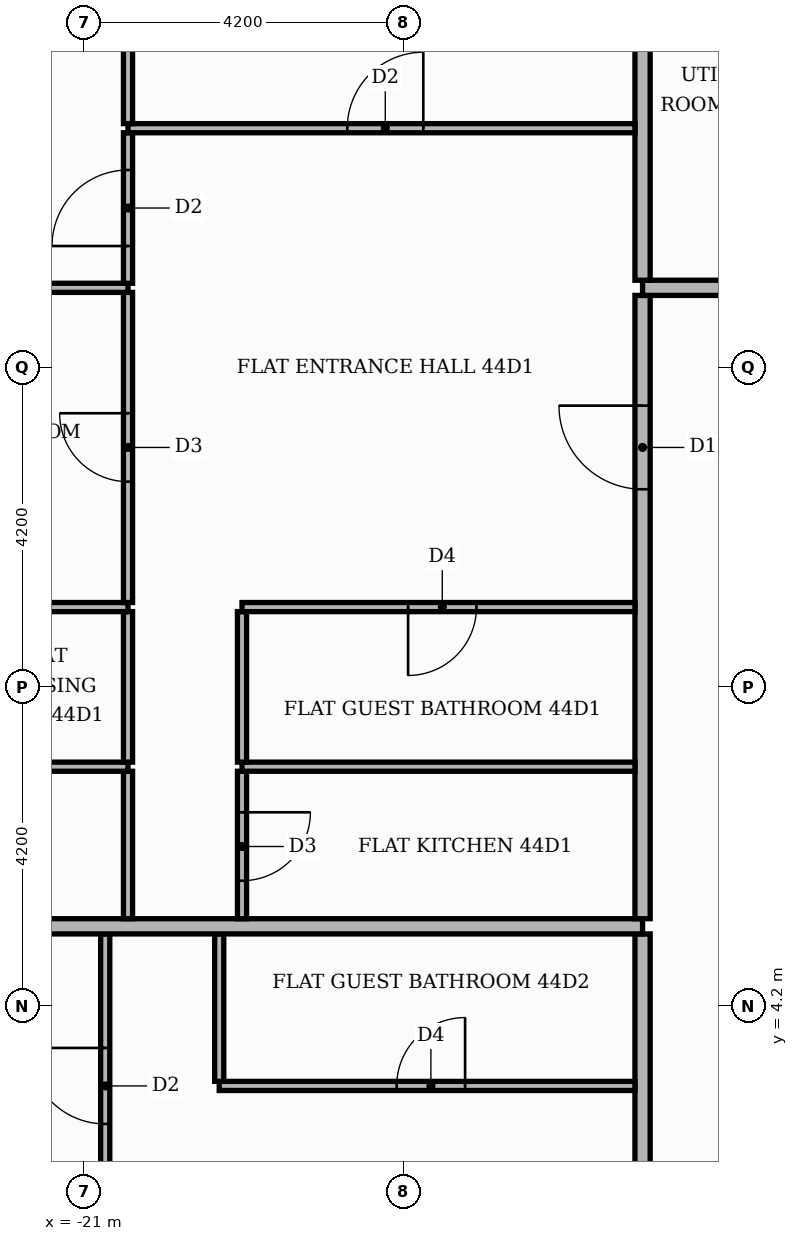
"""IFC4 building model, lengths in metres.
Left out: names, types, materials, properties, quantities, classifications, styles, units other than length and angle.
Written with IfcOpenShell. Run it as: python <this file> out.ifc"""

import sys

from ifc_helpers import new_model, si_unit, direction, frame, frame_2d, origin, place, context, subcontext, project, spatial, rectangle, extrude, element, fill, save


model = new_model("IFC4")
c1 = context("Model", 3, precision=1e-05, world=origin(), true_north=direction((0.0, 1.0)))
c2 = subcontext(c1, "Body", "Model", "MODEL_VIEW")
j1 = project(units=[si_unit("LENGTHUNIT", "METRE"), si_unit("PLANEANGLEUNIT", "RADIAN")], contexts=[c1])
p1 = place(None, origin())
s1 = spatial("IfcSite", under=j1, at=p1, CompositionType="ELEMENT")
p2 = place(p1, origin())
s2 = spatial("IfcBuilding", under=s1, at=p2, CompositionType="ELEMENT")
p3 = place(p2, frame((0.0, 0.0, 188.4)))
s3 = spatial("IfcBuildingStorey", under=s2, at=p3, CompositionType="ELEMENT", Elevation=188.4)
p4 = place(p3, frame((-13.65, -13.55, 0.0), z_axis=(0.0, 0.0, 1.0), x_axis=(0.0, 1.0, 0.0)))
e1 = element("IfcWall", 1, at=p4, inside=s3, PredefinedType="PARTITIONING", context=c2, shape_type="SweptSolid", body=[
    extrude(rectangle(XDim=18.7, YDim=0.2, at=frame_2d((9.35, 0.0))), origin(), (0.0, 0.0, 1.0), 3.48),
])
p5 = place(p4, frame((14.05, 0.0, 0.0)))
e2 = element("IfcOpeningElement", 2, at=p5, cuts=e1, PredefinedType="OPENING", context=c2, shape_type="SweptSolid", body=[
    extrude(rectangle(XDim=1.1, YDim=2.4, at=frame_2d((0.55, 1.2))), frame((0.0, 0.11, 0.0), z_axis=(0.0, -1.0, 0.0), x_axis=(1.0, 0.0, 0.0)), (0.0, 0.0, 1.0), 0.22),
])
p6 = place(p3, frame((-20.72, 1.11, 0.0), z_axis=(0.0, 0.0, 1.0), x_axis=(0.0, 1.0, 0.0)))
e3 = element("IfcWall", 3, at=p6, inside=s3, PredefinedType="PARTITIONING", context=c2, shape_type="SweptSolid", body=[
    extrude(rectangle(XDim=4.04, YDim=0.12, at=frame_2d((2.02, 0.0))), origin(), (0.0, 0.0, 1.0), 3.48),
])
p7 = place(p6, frame((1.54, 0.0, 0.0)))
e4 = element("IfcOpeningElement", 4, at=p7, cuts=e3, PredefinedType="OPENING", context=c2, shape_type="SweptSolid", body=[
    extrude(rectangle(XDim=1.0, YDim=2.1, at=frame_2d((0.5, 1.05))), frame((0.0, 0.07, 0.0), z_axis=(0.0, -1.0, 0.0), x_axis=(1.0, 0.0, 0.0)), (0.0, 0.0, 1.0), 0.14),
])
p8 = place(p3, frame((-19.22, 3.15, 0.0), z_axis=(0.0, 0.0, 1.0), x_axis=(1.0, 0.0, 0.0)))
e5 = element("IfcWall", 5, at=p8, inside=s3, PredefinedType="PARTITIONING", context=c2, shape_type="SweptSolid", body=[
    extrude(rectangle(XDim=5.47, YDim=0.12, at=frame_2d((2.735, 0.0))), origin(), (0.0, 0.0, 1.0), 3.48),
])
p9 = place(p8, frame((2.335, 0.0, 0.0)))
e6 = element("IfcOpeningElement", 6, at=p9, cuts=e5, PredefinedType="OPENING", context=c2, shape_type="SweptSolid", body=[
    extrude(rectangle(XDim=0.9, YDim=2.1, at=frame_2d((0.45, 1.05))), frame((0.0, 0.07, 0.0), z_axis=(0.0, -1.0, 0.0), x_axis=(1.0, 0.0, 0.0)), (0.0, 0.0, 1.0), 0.14),
])
p10 = place(p3, frame((-19.22, 3.21, 0.0), z_axis=(0.0, 0.0, 1.0), x_axis=(0.0, 1.0, 0.0)))
e7 = element("IfcWall", 7, at=p10, inside=s3, PredefinedType="PARTITIONING", context=c2, shape_type="SweptSolid", body=[
    extrude(rectangle(XDim=1.94, YDim=0.12, at=frame_2d((0.97, 0.0))), origin(), (0.0, 0.0, 1.0), 3.48),
])
p11 = place(p3, frame((-25.42, 5.25, 0.0), z_axis=(0.0, 0.0, 1.0), x_axis=(1.0, 0.0, 0.0)))
e8 = element("IfcWall", 8, at=p11, inside=s3, PredefinedType="PARTITIONING", context=c2, shape_type="SweptSolid", body=[
    extrude(rectangle(XDim=11.77, YDim=0.2, at=frame_2d((5.885, 0.0))), origin(), (0.0, 0.0, 1.0), 3.48),
])
p12 = place(p3, frame((-20.42, 5.35, 0.0), z_axis=(0.0, 0.0, 1.0), x_axis=(0.0, 1.0, 0.0)))
e9 = element("IfcWall", 9, at=p12, inside=s3, PredefinedType="PARTITIONING", context=c2, shape_type="SweptSolid", body=[
    extrude(rectangle(XDim=1.94, YDim=0.12, at=frame_2d((0.97, 0.0))), origin(), (0.0, 0.0, 1.0), 3.48),
])
p13 = place(p3, frame((-18.92, 5.35, 0.0), z_axis=(0.0, 0.0, 1.0), x_axis=(0.0, 1.0, 0.0)))
e10 = element("IfcWall", 10, at=p13, inside=s3, PredefinedType="PARTITIONING", context=c2, shape_type="SweptSolid", body=[
    extrude(rectangle(XDim=1.94, YDim=0.12, at=frame_2d((0.97, 0.0))), origin(), (0.0, 0.0, 1.0), 3.48),
])
p14 = place(p13, frame((0.5, 0.0, 0.0)))
e11 = element("IfcOpeningElement", 11, at=p14, cuts=e10, PredefinedType="OPENING", context=c2, shape_type="SweptSolid", body=[
    extrude(rectangle(XDim=0.9, YDim=2.1, at=frame_2d((0.45, 1.05))), frame((0.0, 0.07, 0.0), z_axis=(0.0, -1.0, 0.0), x_axis=(1.0, 0.0, 0.0)), (0.0, 0.0, 1.0), 0.14),
])
p15 = place(p3, frame((-13.65, 5.35, 0.0), z_axis=(0.0, 0.0, 1.0), x_axis=(0.0, 1.0, 0.0)))
e12 = element("IfcWall", 12, at=p15, inside=s3, PredefinedType="PARTITIONING", context=c2, shape_type="SweptSolid", body=[
    extrude(rectangle(XDim=8.2, YDim=0.2, at=frame_2d((4.1, 0.0))), origin(), (0.0, 0.0, 1.0), 3.48),
])
p16 = place(p15, frame((5.65, 0.0, 0.0)))
e13 = element("IfcOpeningElement", 13, at=p16, cuts=e12, PredefinedType="OPENING", context=c2, shape_type="SweptSolid", body=[
    extrude(rectangle(XDim=1.1, YDim=2.4, at=frame_2d((0.55, 1.2))), frame((0.0, 0.11, 0.0), z_axis=(0.0, -1.0, 0.0), x_axis=(1.0, 0.0, 0.0)), (0.0, 0.0, 1.0), 0.22),
])
p17 = place(p3, frame((-25.42, 7.35, 0.0), z_axis=(0.0, 0.0, 1.0), x_axis=(1.0, 0.0, 0.0)))
e14 = element("IfcWall", 14, at=p17, inside=s3, PredefinedType="PARTITIONING", context=c2, shape_type="SweptSolid", body=[
    extrude(rectangle(XDim=5.0, YDim=0.12, at=frame_2d((2.5, 0.0))), origin(), (0.0, 0.0, 1.0), 3.48),
])
p18 = place(p17, frame((1.9, 0.0, 0.0)))
e15 = element("IfcOpeningElement", 15, at=p18, cuts=e14, PredefinedType="OPENING", context=c2, shape_type="SweptSolid", body=[
    extrude(rectangle(XDim=0.9, YDim=2.1, at=frame_2d((0.45, 1.05))), frame((0.0, 0.07, 0.0), z_axis=(0.0, -1.0, 0.0), x_axis=(1.0, 0.0, 0.0)), (0.0, 0.0, 1.0), 0.14),
])
p19 = place(p3, frame((-18.92, 7.35, 0.0), z_axis=(0.0, 0.0, 1.0), x_axis=(1.0, 0.0, 0.0)))
e16 = element("IfcWall", 16, at=p19, inside=s3, PredefinedType="PARTITIONING", context=c2, shape_type="SweptSolid", body=[
    extrude(rectangle(XDim=5.17, YDim=0.12, at=frame_2d((2.585, 0.0))), origin(), (0.0, 0.0, 1.0), 3.48),
])
for number, where, z_axis, x_axis in (
    (17, (-20.42, 7.41, 0.0), (0.0, 0.0, 1.0), (0.0, 1.0, 0.0)),
    (18, (-18.92, 7.41, 0.0), (0.0, 0.0, 1.0), (0.0, 1.0, 0.0)),
):
    element("IfcWall", number, at=place(p3, frame(where, z_axis=z_axis, x_axis=x_axis)), inside=s3, PredefinedType="PARTITIONING", context=c2, shape_type="SweptSolid", body=[
        extrude(rectangle(XDim=1.98, YDim=0.12, at=frame_2d((0.99, 0.0))), origin(), (0.0, 0.0, 1.0), 3.48),
    ])
p20 = place(p3, frame((-25.42, 9.45, 0.0), z_axis=(0.0, 0.0, 1.0), x_axis=(1.0, 0.0, 0.0)))
e19 = element("IfcWall", 19, at=p20, inside=s3, PredefinedType="PARTITIONING", context=c2, shape_type="SweptSolid", body=[
    extrude(rectangle(XDim=5.0, YDim=0.12, at=frame_2d((2.5, 0.0))), origin(), (0.0, 0.0, 1.0), 3.48),
])
p21 = place(p20, frame((1.9, 0.0, 0.0)))
e20 = element("IfcOpeningElement", 20, at=p21, cuts=e19, PredefinedType="OPENING", context=c2, shape_type="SweptSolid", body=[
    extrude(rectangle(XDim=0.9, YDim=2.1, at=frame_2d((0.45, 1.05))), frame((0.0, 0.07, 0.0), z_axis=(0.0, -1.0, 0.0), x_axis=(1.0, 0.0, 0.0)), (0.0, 0.0, 1.0), 0.14),
])
p22 = place(p3, frame((-18.92, 9.45, 0.0), z_axis=(0.0, 0.0, 1.0), x_axis=(1.0, 0.0, 0.0)))
e21 = element("IfcWall", 21, at=p22, inside=s3, PredefinedType="PARTITIONING", context=c2, shape_type="SweptSolid", body=[
    extrude(rectangle(XDim=5.17, YDim=0.12, at=frame_2d((2.585, 0.0))), origin(), (0.0, 0.0, 1.0), 3.48),
])
p23 = place(p22, frame((2.185, 0.0, 0.0)))
e22 = element("IfcOpeningElement", 22, at=p23, cuts=e21, PredefinedType="OPENING", context=c2, shape_type="SweptSolid", body=[
    extrude(rectangle(XDim=0.9, YDim=2.1, at=frame_2d((0.45, 1.05))), frame((0.0, 0.07, 0.0), z_axis=(0.0, -1.0, 0.0), x_axis=(1.0, 0.0, 0.0)), (0.0, 0.0, 1.0), 0.14),
])
p24 = place(p3, frame((-20.42, 9.51, 0.0), z_axis=(0.0, 0.0, 1.0), x_axis=(0.0, 1.0, 0.0)))
e23 = element("IfcWall", 23, at=p24, inside=s3, PredefinedType="PARTITIONING", context=c2, shape_type="SweptSolid", body=[
    extrude(rectangle(XDim=4.08, YDim=0.12, at=frame_2d((2.04, 0.0))), origin(), (0.0, 0.0, 1.0), 3.48),
])
p25 = place(p24, frame((1.59, 0.0, 0.0)))
e24 = element("IfcOpeningElement", 24, at=p25, cuts=e23, PredefinedType="OPENING", context=c2, shape_type="SweptSolid", body=[
    extrude(rectangle(XDim=0.9, YDim=2.1, at=frame_2d((0.45, 1.05))), frame((0.0, 0.07, 0.0), z_axis=(0.0, -1.0, 0.0), x_axis=(1.0, 0.0, 0.0)), (0.0, 0.0, 1.0), 0.14),
])
p26 = place(p3, frame((-25.42, 13.65, 0.0), z_axis=(0.0, 0.0, 1.0), x_axis=(1.0, 0.0, 0.0)))
e25 = element("IfcWall", 25, at=p26, inside=s3, PredefinedType="PARTITIONING", context=c2, shape_type="SweptSolid", body=[
    extrude(rectangle(XDim=5.0, YDim=0.12, at=frame_2d((2.5, 0.0))), origin(), (0.0, 0.0, 1.0), 3.48),
])
p27 = place(p3, frame((-13.65, 13.65, 0.0), z_axis=(0.0, 0.0, 1.0), x_axis=(1.0, 0.0, 0.0)))
e26 = element("IfcWall", 26, at=p27, inside=s3, PredefinedType="PARTITIONING", context=c2, shape_type="SweptSolid", body=[
    extrude(rectangle(XDim=39.07, YDim=0.2, at=frame_2d((19.535, 0.0))), origin(), (0.0, 0.0, 1.0), 3.48),
])
p28 = place(p27, frame((24.65, 0.0, 0.0)))
e27 = element("IfcOpeningElement", 27, at=p28, cuts=e26, PredefinedType="OPENING", context=c2, shape_type="SweptSolid", body=[
    extrude(rectangle(XDim=1.1, YDim=2.4, at=frame_2d((0.55, 1.2))), frame((0.0, 0.11, 0.0), z_axis=(0.0, -1.0, 0.0), x_axis=(1.0, 0.0, 0.0)), (0.0, 0.0, 1.0), 0.22),
])
p29 = place(p27, frame((12.05, 0.0, 0.0)))
e28 = element("IfcOpeningElement", 28, at=p29, cuts=e26, PredefinedType="OPENING", context=c2, shape_type="SweptSolid", body=[
    extrude(rectangle(XDim=1.1, YDim=2.4, at=frame_2d((0.55, 1.2))), frame((0.0, 0.11, 0.0), z_axis=(0.0, -1.0, 0.0), x_axis=(1.0, 0.0, 0.0)), (0.0, 0.0, 1.0), 0.22),
])
p30 = place(p3, frame((-20.42, 13.71, 0.0), z_axis=(0.0, 0.0, 1.0), x_axis=(0.0, 1.0, 0.0)))
e29 = element("IfcWall", 29, at=p30, inside=s3, PredefinedType="PARTITIONING", context=c2, shape_type="SweptSolid", body=[
    extrude(rectangle(XDim=1.98, YDim=0.12, at=frame_2d((0.99, 0.0))), origin(), (0.0, 0.0, 1.0), 3.48),
])
p31 = place(p30, frame((0.49, 0.0, 0.0)))
e30 = element("IfcOpeningElement", 30, at=p31, cuts=e29, PredefinedType="OPENING", context=c2, shape_type="SweptSolid", body=[
    extrude(rectangle(XDim=1.0, YDim=2.1, at=frame_2d((0.5, 1.05))), frame((0.0, 0.07, 0.0), z_axis=(0.0, -1.0, 0.0), x_axis=(1.0, 0.0, 0.0)), (0.0, 0.0, 1.0), 0.14),
])
p32 = place(p3, frame((-13.65, 13.75, 0.0), z_axis=(0.0, 0.0, 1.0), x_axis=(0.0, 1.0, 0.0)))
e31 = element("IfcWall", 31, at=p32, inside=s3, PredefinedType="PARTITIONING", context=c2, shape_type="SweptSolid", body=[
    extrude(rectangle(XDim=11.67, YDim=0.2, at=frame_2d((5.835, 0.0))), origin(), (0.0, 0.0, 1.0), 3.48),
])
p33 = place(p3, frame((-20.42, 15.75, 0.0), z_axis=(0.0, 0.0, 1.0), x_axis=(1.0, 0.0, 0.0)))
e32 = element("IfcWall", 32, at=p33, inside=s3, PredefinedType="PARTITIONING", context=c2, shape_type="SweptSolid", body=[
    extrude(rectangle(XDim=6.67, YDim=0.12, at=frame_2d((3.335, 0.0))), origin(), (0.0, 0.0, 1.0), 3.48),
])
p34 = place(p33, frame((2.885, 0.0, 0.0)))
e33 = element("IfcOpeningElement", 33, at=p34, cuts=e32, PredefinedType="OPENING", context=c2, shape_type="SweptSolid", body=[
    extrude(rectangle(XDim=1.0, YDim=2.1, at=frame_2d((0.5, 1.05))), frame((0.0, 0.07, 0.0), z_axis=(0.0, -1.0, 0.0), x_axis=(1.0, 0.0, 0.0)), (0.0, 0.0, 1.0), 0.14),
])
p35 = place(p3, frame((-20.42, 15.81, 0.0), z_axis=(0.0, 0.0, 1.0), x_axis=(0.0, 1.0, 0.0)))
e34 = element("IfcWall", 34, at=p35, inside=s3, PredefinedType="PARTITIONING", context=c2, shape_type="SweptSolid", body=[
    extrude(rectangle(XDim=5.349, YDim=0.12, at=frame_2d((2.674, 0.0))), origin(), (0.0, 0.0, 1.0), 3.48),
])
p36 = place(p16, origin())
e35 = element("IfcDoor", 35, at=p36, inside=s3, OperationType="SINGLE_SWING_RIGHT", PredefinedType="DOOR", context=c2, shape_type="SweptSolid", body=[
    extrude(rectangle(XDim=1.1, YDim=2.4, at=frame_2d((0.55, 1.2))), frame((0.0, 0.025, 0.0), z_axis=(0.0, -1.0, 0.0), x_axis=(1.0, 0.0, 0.0)), (0.0, 0.0, 1.0), 0.05),
])
fill(e13, e35)
p37 = place(p34, origin())
e36 = element("IfcDoor", 36, at=p37, inside=s3, OperationType="SINGLE_SWING_RIGHT", PredefinedType="DOOR", context=c2, shape_type="SweptSolid", body=[
    extrude(rectangle(XDim=1.0, YDim=2.1, at=frame_2d((0.5, 1.05))), frame((0.0, 0.025, 0.0), z_axis=(0.0, -1.0, 0.0), x_axis=(1.0, 0.0, 0.0)), (0.0, 0.0, 1.0), 0.05),
])
fill(e33, e36)
p38 = place(p23, frame((0.9, 0.0, 0.0), z_axis=(0.0, 0.0, 1.0), x_axis=(-1.0, 0.0, 0.0)))
e37 = element("IfcDoor", 37, at=p38, inside=s3, OperationType="SINGLE_SWING_LEFT", PredefinedType="DOOR", context=c2, shape_type="SweptSolid", body=[
    extrude(rectangle(XDim=0.9, YDim=2.1, at=frame_2d((0.45, 1.05))), frame((0.0, 0.025, 0.0), z_axis=(0.0, -1.0, 0.0), x_axis=(1.0, 0.0, 0.0)), (0.0, 0.0, 1.0), 0.05),
])
fill(e22, e37)
p39 = place(p14, frame((0.9, 0.0, 0.0), z_axis=(0.0, 0.0, 1.0), x_axis=(-1.0, 0.0, 0.0)))
e38 = element("IfcDoor", 38, at=p39, inside=s3, OperationType="SINGLE_SWING_RIGHT", PredefinedType="DOOR", context=c2, shape_type="SweptSolid", body=[
    extrude(rectangle(XDim=0.9, YDim=2.1, at=frame_2d((0.45, 1.05))), frame((0.0, 0.025, 0.0), z_axis=(0.0, -1.0, 0.0), x_axis=(1.0, 0.0, 0.0)), (0.0, 0.0, 1.0), 0.05),
])
fill(e11, e38)
p40 = place(p31, origin())
e39 = element("IfcDoor", 39, at=p40, inside=s3, OperationType="SINGLE_SWING_LEFT", PredefinedType="DOOR", context=c2, shape_type="SweptSolid", body=[
    extrude(rectangle(XDim=1.0, YDim=2.1, at=frame_2d((0.5, 1.05))), frame((0.0, 0.025, 0.0), z_axis=(0.0, -1.0, 0.0), x_axis=(1.0, 0.0, 0.0)), (0.0, 0.0, 1.0), 0.05),
])
fill(e30, e39)
p41 = place(p25, origin())
e40 = element("IfcDoor", 40, at=p41, inside=s3, OperationType="SINGLE_SWING_RIGHT", PredefinedType="DOOR", context=c2, shape_type="SweptSolid", body=[
    extrude(rectangle(XDim=0.9, YDim=2.1, at=frame_2d((0.45, 1.05))), frame((0.0, 0.025, 0.0), z_axis=(0.0, -1.0, 0.0), x_axis=(1.0, 0.0, 0.0)), (0.0, 0.0, 1.0), 0.05),
])
fill(e24, e40)
p42 = place(p9, origin())
e41 = element("IfcDoor", 41, at=p42, inside=s3, OperationType="SINGLE_SWING_RIGHT", PredefinedType="DOOR", context=c2, shape_type="SweptSolid", body=[
    extrude(rectangle(XDim=0.9, YDim=2.1, at=frame_2d((0.45, 1.05))), frame((0.0, 0.025, 0.0), z_axis=(0.0, -1.0, 0.0), x_axis=(1.0, 0.0, 0.0)), (0.0, 0.0, 1.0), 0.05),
])
fill(e6, e41)
p43 = place(p7, origin())
e42 = element("IfcDoor", 42, at=p43, inside=s3, OperationType="SINGLE_SWING_RIGHT", PredefinedType="DOOR", context=c2, shape_type="SweptSolid", body=[
    extrude(rectangle(XDim=1.0, YDim=2.1, at=frame_2d((0.5, 1.05))), frame((0.0, 0.025, 0.0), z_axis=(0.0, -1.0, 0.0), x_axis=(1.0, 0.0, 0.0)), (0.0, 0.0, 1.0), 0.05),
])
fill(e4, e42)
save(model, sys.argv[1])
